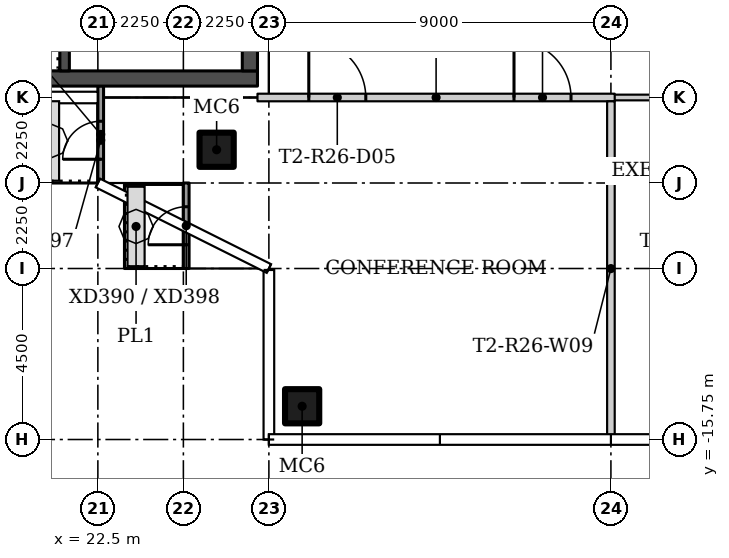
"""IFC4 building model, lengths in metres.
Left out: names, types, materials, properties, quantities, classifications, styles, units other than length and angle.
Written with IfcOpenShell. Run it as: python <this file> out.ifc"""

import sys

from ifc_helpers import new_model, si_unit, direction, frame, frame_2d, origin, origin_2d, place, context, subcontext, project, spatial, rectangle, hollow_rectangle, extrude, element, fill, save


model = new_model("IFC4")
c1 = context("Model", 3, precision=1e-05, world=origin(), true_north=direction((0.0, 1.0)))
c2 = subcontext(c1, "Body", "Model", "MODEL_VIEW")
j1 = project(units=[si_unit("LENGTHUNIT", "METRE"), si_unit("PLANEANGLEUNIT", "RADIAN")], contexts=[c1])
p1 = place(None, origin())
s1 = spatial("IfcSite", under=j1, at=p1, CompositionType="ELEMENT")
p2 = place(p1, origin())
s2 = spatial("IfcBuilding", under=s1, at=p2, CompositionType="ELEMENT")
p3 = place(p2, frame((0.0, 0.0, 242.1)))
s3 = spatial("IfcBuildingStorey", under=s2, at=p3, CompositionType="ELEMENT", Elevation=242.1)
for number, where in (
    (1, (25.625, -8.125, 0.0)),
    (2, (27.875, -14.875, 0.0)),
):
    element("IfcColumn", number, at=place(p3, frame(where)), inside=s3, PredefinedType="COLUMN", context=c2, shape_type="SweptSolid", body=[
        extrude(hollow_rectangle(XDim=0.9, YDim=0.9, WallThickness=0.036, at=origin_2d()), origin(), (0.0, 0.0, 1.0), 3.55),
    ])
p4 = place(p3, frame((40.8, -6.75, 0.0), z_axis=(0.0, 0.0, 1.0), x_axis=(-1.0, 0.0, 0.0)))
e3 = element("IfcWall", 3, at=p4, inside=s3, PredefinedType="PARTITIONING", context=c2, shape_type="SweptSolid", body=[
    extrude(rectangle(XDim=4.9, YDim=0.15, at=frame_2d((2.45, 0.0))), origin(), (0.0, 0.0, 1.0), 3.55),
])
p5 = place(p4, frame((2.05, 0.0, 0.0)))
e4 = element("IfcOpeningElement", 4, at=p5, cuts=e3, PredefinedType="OPENING", context=c2, shape_type="SweptSolid", body=[
    extrude(rectangle(XDim=1.0, YDim=2.4, at=frame_2d((0.5, 1.2))), frame((0.0, 0.085, 0.0), z_axis=(0.0, -1.0, 0.0), x_axis=(1.0, 0.0, 0.0)), (0.0, 0.0, 1.0), 0.17),
])
p6 = place(p3, frame((26.7, -6.75, 0.0)))
e5 = element("IfcWall", 5, at=p6, inside=s3, PredefinedType="PARTITIONING", context=c2, shape_type="SweptSolid", body=[
    extrude(rectangle(XDim=9.4, YDim=0.2, at=frame_2d((4.7, 0.0))), origin(), (0.0, 0.0, 1.0), 3.55),
])
p7 = place(p6, frame((6.75, 0.0, 0.0)))
e6 = element("IfcOpeningElement", 6, at=p7, cuts=e5, PredefinedType="OPENING", context=c2, shape_type="SweptSolid", body=[
    extrude(rectangle(XDim=1.5, YDim=2.4, at=frame_2d((0.75, 1.2))), frame((0.0, 0.11, 0.0), z_axis=(0.0, -1.0, 0.0), x_axis=(1.0, 0.0, 0.0)), (0.0, 0.0, 1.0), 0.22),
])
p8 = place(p6, frame((1.35, 0.0, 0.0)))
e7 = element("IfcOpeningElement", 7, at=p8, cuts=e5, PredefinedType="OPENING", context=c2, shape_type="SweptSolid", body=[
    extrude(rectangle(XDim=1.5, YDim=2.4, at=frame_2d((0.75, 1.2))), frame((0.0, 0.11, 0.0), z_axis=(0.0, -1.0, 0.0), x_axis=(1.0, 0.0, 0.0)), (0.0, 0.0, 1.0), 0.22),
])
p9 = place(p3, frame((36.0, -6.85, 0.0), z_axis=(0.0, 0.0, 1.0), x_axis=(0.0, -1.0, 0.0)))
e8 = element("IfcWall", 8, at=p9, inside=s3, PredefinedType="PARTITIONING", context=c2, shape_type="SweptSolid", body=[
    extrude(rectangle(XDim=8.805, YDim=0.2, at=frame_2d((4.402, 0.0))), origin(), (0.0, 0.0, 1.0), 3.55),
])
p10 = place(p3, frame((22.575, -9.0, 0.0), z_axis=(0.0, 0.0, 1.0), x_axis=(0.0, 1.0, 0.0)))
e9 = element("IfcWall", 9, at=p10, inside=s3, PredefinedType="SOLIDWALL", context=c2, shape_type="SweptSolid", body=[
    extrude(rectangle(XDim=2.557, YDim=0.15, at=frame_2d((1.278, 0.0))), origin(), (0.0, 0.0, 1.0), 3.45),
])
p11 = place(p10, frame((0.625, 0.0, 0.0)))
e10 = element("IfcOpeningElement", 10, at=p11, cuts=e9, PredefinedType="OPENING", context=c2, shape_type="SweptSolid", body=[
    extrude(rectangle(XDim=1.0, YDim=2.4, at=frame_2d((0.5, 1.2))), frame((0.0, 0.085, 0.0), z_axis=(0.0, -1.0, 0.0), x_axis=(1.0, 0.0, 0.0)), (0.0, 0.0, 1.0), 0.17),
])
p12 = place(p3, frame((24.825, -11.25, 0.0), z_axis=(0.0, 0.0, 1.0), x_axis=(0.0, 1.0, 0.0)))
e11 = element("IfcWall", 11, at=p12, inside=s3, PredefinedType="SOLIDWALL", context=c2, shape_type="SweptSolid", body=[
    extrude(rectangle(XDim=2.25, YDim=0.15, at=frame_2d((1.125, 0.0))), origin(), (0.0, 0.0, 1.0), 3.45),
])
p13 = place(p12, frame((0.625, 0.0, 0.0)))
e12 = element("IfcOpeningElement", 12, at=p13, cuts=e11, PredefinedType="OPENING", context=c2, shape_type="SweptSolid", body=[
    extrude(rectangle(XDim=1.0, YDim=2.4, at=frame_2d((0.5, 1.2))), frame((0.0, 0.085, 0.0), z_axis=(0.0, -1.0, 0.0), x_axis=(1.0, 0.0, 0.0)), (0.0, 0.0, 1.0), 0.17),
])
p14 = place(p3, frame((13.8, -6.25, 0.0)))
e13 = element("IfcWall", 13, at=p14, inside=s3, PredefinedType="SHEAR", context=c2, shape_type="SweptSolid", body=[
    extrude(rectangle(XDim=12.9, YDim=0.4, at=frame_2d((6.45, 0.0))), origin(), (0.0, 0.0, 1.0), 3.55),
])
p15 = place(p3, frame((26.5, 6.05, 0.0), z_axis=(0.0, 0.0, 1.0), x_axis=(0.0, -1.0, 0.0)))
e14 = element("IfcWall", 14, at=p15, inside=s3, PredefinedType="SHEAR", context=c2, shape_type="SweptSolid", body=[
    extrude(rectangle(XDim=12.1, YDim=0.4, at=frame_2d((6.05, 0.0))), origin(), (0.0, 0.0, 1.0), 3.55),
])
p16 = place(p15, frame((10.1, 0.0, 0.0)))
e15 = element("IfcOpeningElement", 15, at=p16, cuts=e14, PredefinedType="OPENING", context=c2, shape_type="SweptSolid", body=[
    extrude(rectangle(XDim=1.2, YDim=2.1, at=frame_2d((0.6, 1.05))), frame((0.0, 0.21, 0.0), z_axis=(0.0, -1.0, 0.0), x_axis=(1.0, 0.0, 0.0)), (0.0, 0.0, 1.0), 0.42),
])
p17 = place(p15, frame((3.9, 0.0, 0.0)))
e16 = element("IfcOpeningElement", 16, at=p17, cuts=e14, PredefinedType="OPENING", context=c2, shape_type="SweptSolid", body=[
    extrude(rectangle(XDim=1.8, YDim=2.4, at=frame_2d((0.9, 1.2))), frame((0.0, 0.21, 0.0), z_axis=(0.0, -1.0, 0.0), x_axis=(1.0, 0.0, 0.0)), (0.0, 0.0, 1.0), 0.42),
])
p18 = place(p3, frame((21.625, -6.05, 0.0), z_axis=(0.0, 0.0, 1.0), x_axis=(0.0, 1.0, 0.0)))
e17 = element("IfcWall", 17, at=p18, inside=s3, PredefinedType="SHEAR", context=c2, shape_type="SweptSolid", body=[
    extrude(rectangle(XDim=2.55, YDim=0.25, at=frame_2d((1.275, 0.0))), origin(), (0.0, 0.0, 1.0), 3.55),
])
p19 = place(p7, origin())
e18 = element("IfcDoor", 18, at=p19, inside=s3, OperationType="DOUBLE_DOOR_SINGLE_SWING", PredefinedType="DOOR", context=c2, shape_type="SweptSolid", body=[
    extrude(rectangle(XDim=1.5, YDim=2.4, at=frame_2d((0.75, 1.2))), frame((0.0, 0.025, 0.0), z_axis=(0.0, -1.0, 0.0), x_axis=(1.0, 0.0, 0.0)), (0.0, 0.0, 1.0), 0.05),
])
fill(e6, e18)
p20 = place(p8, origin())
e19 = element("IfcDoor", 19, at=p20, inside=s3, OperationType="DOUBLE_DOOR_SINGLE_SWING", PredefinedType="DOOR", context=c2, shape_type="SweptSolid", body=[
    extrude(rectangle(XDim=1.5, YDim=2.4, at=frame_2d((0.75, 1.2))), frame((0.0, 0.025, 0.0), z_axis=(0.0, -1.0, 0.0), x_axis=(1.0, 0.0, 0.0)), (0.0, 0.0, 1.0), 0.05),
])
fill(e7, e19)
p21 = place(p11, origin())
e20 = element("IfcDoor", 20, at=p21, inside=s3, OperationType="SINGLE_SWING_LEFT", PredefinedType="DOOR", context=c2, shape_type="SweptSolid", body=[
    extrude(rectangle(XDim=1.0, YDim=2.4, at=frame_2d((0.5, 1.2))), frame((0.0, 0.025, 0.0), z_axis=(0.0, -1.0, 0.0), x_axis=(1.0, 0.0, 0.0)), (0.0, 0.0, 1.0), 0.05),
])
fill(e10, e20)
p22 = place(p13, origin())
e21 = element("IfcDoor", 21, at=p22, inside=s3, OperationType="SINGLE_SWING_RIGHT", PredefinedType="DOOR", context=c2, shape_type="SweptSolid", body=[
    extrude(rectangle(XDim=1.0, YDim=2.4, at=frame_2d((0.5, 1.2))), frame((0.0, 0.025, 0.0), z_axis=(0.0, -1.0, 0.0), x_axis=(1.0, 0.0, 0.0)), (0.0, 0.0, 1.0), 0.05),
])
fill(e12, e21)
save(model, sys.argv[1])
